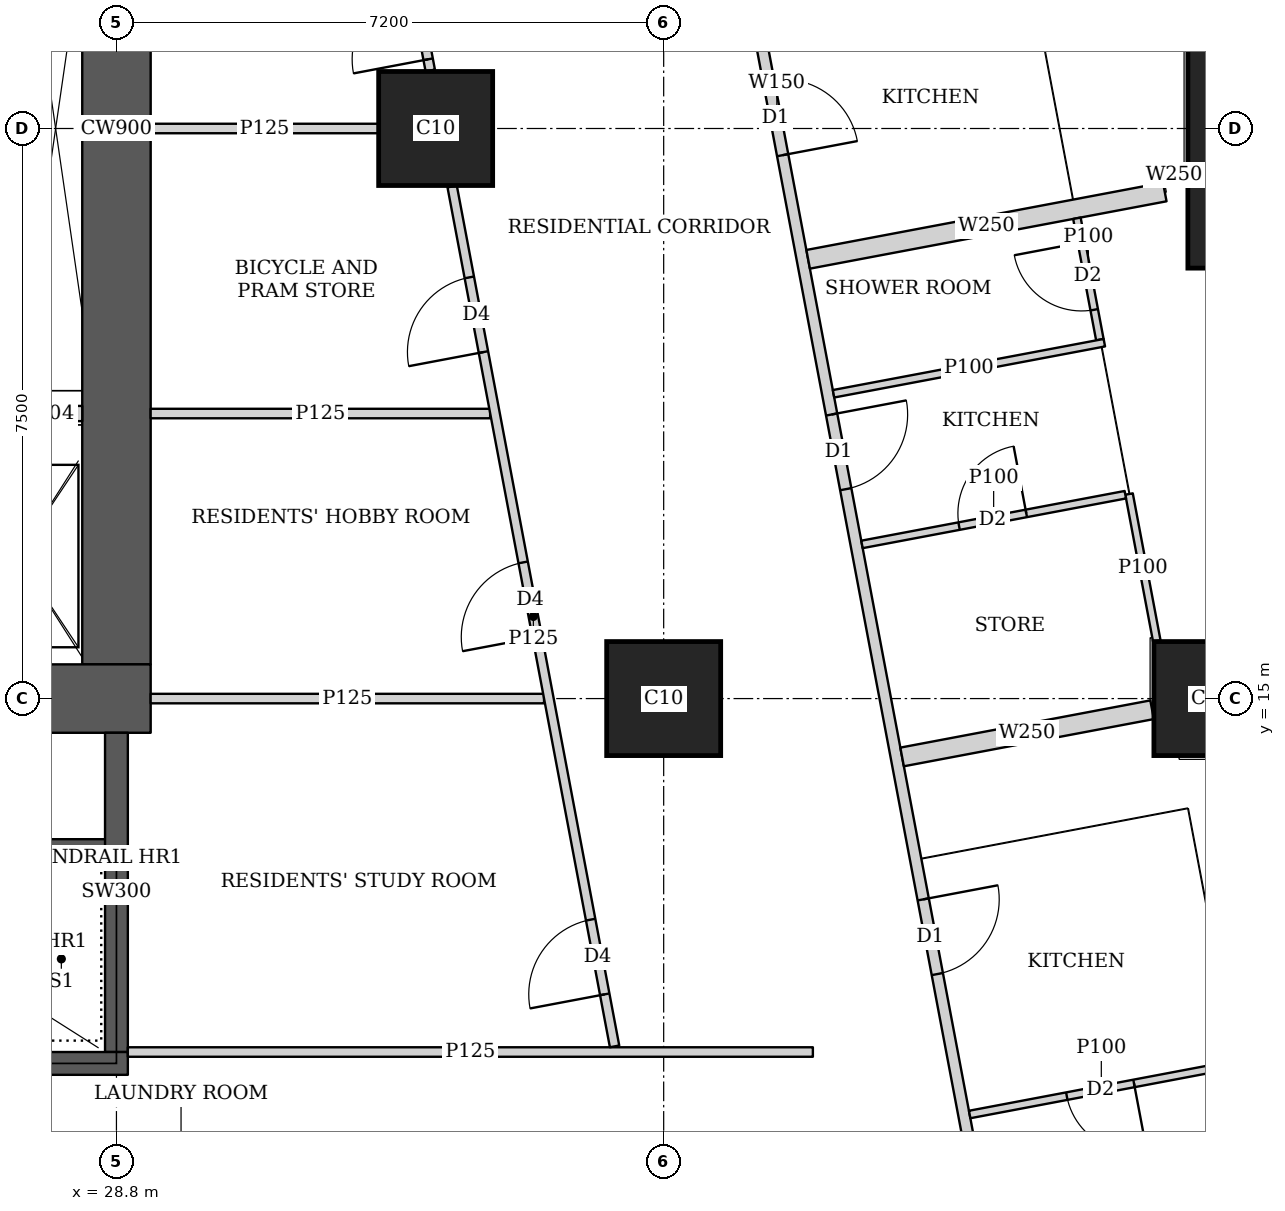
"""IFC4 building model, lengths in metres.
Left out: names, types, materials, properties, quantities, classifications, styles, units other than length and angle.
Written with IfcOpenShell. Run it as: python <this file> out.ifc"""

import sys

from ifc_helpers import new_model, si_unit, direction, frame, frame_2d, origin, origin_2d, place, context, subcontext, project, spatial, rectangle, extrude, element, fill, save


model = new_model("IFC4")
c1 = context("Model", 3, precision=1e-05, world=origin(), true_north=direction((0.0, 1.0)))
c2 = subcontext(c1, "Body", "Model", "MODEL_VIEW")
j1 = project(units=[si_unit("LENGTHUNIT", "METRE"), si_unit("PLANEANGLEUNIT", "RADIAN")], contexts=[c1])
p1 = place(None, origin())
s1 = spatial("IfcSite", under=j1, at=p1, CompositionType="ELEMENT")
p2 = place(p1, origin())
s2 = spatial("IfcBuilding", under=s1, at=p2, CompositionType="ELEMENT")
p3 = place(p2, frame((0.0, 0.0, 139.55)))
s3 = spatial("IfcBuildingStorey", under=s2, at=p3, CompositionType="ELEMENT", Elevation=139.55)
for number, where, z_axis, x_axis in (
    (1, (36.0, 15.0, 0.0), (0.0, 0.0, 1.0), (1.0, 0.0, 0.0)),
    (2, (43.2, 15.0, 0.0), (0.0, 0.0, 1.0), (1.0, 0.0, 0.0)),
    (3, (33.0, 22.5, 0.0), (0.0, 0.0, 1.0), (1.0, 0.0, 0.0)),
):
    element("IfcColumn", number, at=place(p3, frame(where, z_axis=z_axis, x_axis=x_axis)), inside=s3, PredefinedType="COLUMN", context=c2, shape_type="SweptSolid", body=[
        extrude(rectangle(XDim=1.5, YDim=1.5, at=origin_2d()), origin(), (0.0, 0.0, 1.0), 3.75),
    ])
p4 = place(p3, frame((44.697, 22.263, 0.0), z_axis=(0.0, 0.0, 1.0), x_axis=(1.0, 0.0, 0.0)))
e4 = element("IfcColumn", 4, at=p4, inside=s3, PredefinedType="COLUMN", context=c2, shape_type="SweptSolid", body=[
    extrude(rectangle(XDim=3.6, YDim=3.2, at=origin_2d()), origin(), (0.0, 0.0, 1.0), 3.75),
])
p5 = place(p3, frame((13.95, 15.0, 0.0), z_axis=(0.0, 0.0, 1.0), x_axis=(1.0, 0.0, 0.0)))
e5 = element("IfcWall", 5, at=p5, inside=s3, PredefinedType="SHEAR", context=c2, shape_type="SweptSolid", body=[
    extrude(rectangle(XDim=15.3, YDim=0.9, at=frame_2d((7.65, 0.0))), origin(), (0.0, 0.0, 1.0), 3.75),
])
p6 = place(p5, frame((4.45, 0.0, 0.0)))
e6 = element("IfcOpeningElement", 6, at=p6, cuts=e5, PredefinedType="OPENING", context=c2, shape_type="SweptSolid", body=[
    extrude(rectangle(XDim=1.8, YDim=2.1, at=frame_2d((0.9, 1.05))), frame((0.0, 0.46, 0.0), z_axis=(0.0, -1.0, 0.0), x_axis=(1.0, 0.0, 0.0)), (0.0, 0.0, 1.0), 0.92),
])
p7 = place(p5, frame((10.7, 0.0, 0.0)))
e7 = element("IfcOpeningElement", 7, at=p7, cuts=e5, PredefinedType="OPENING", context=c2, shape_type="SweptSolid", body=[
    extrude(rectangle(XDim=1.1, YDim=2.1, at=frame_2d((0.55, 1.05))), frame((0.0, 0.46, 0.0), z_axis=(0.0, -1.0, 0.0), x_axis=(1.0, 0.0, 0.0)), (0.0, 0.0, 1.0), 0.92),
])
p8 = place(p3, frame((28.8, 15.45, 0.0), z_axis=(0.0, 0.0, 1.0), x_axis=(0.0, 1.0, 0.0)))
e8 = element("IfcWall", 8, at=p8, inside=s3, PredefinedType="SHEAR", context=c2, shape_type="SweptSolid", body=[
    extrude(rectangle(XDim=14.1, YDim=0.9, at=frame_2d((7.05, 0.0))), origin(), (0.0, 0.0, 1.0), 3.75),
])
p9 = place(p3, frame((21.45, 10.2, 0.0), z_axis=(0.0, 0.0, 1.0), x_axis=(1.0, 0.0, 0.0)))
e9 = element("IfcWall", 9, at=p9, inside=s3, PredefinedType="SHEAR", context=c2, shape_type="SweptSolid", body=[
    extrude(rectangle(XDim=7.5, YDim=0.3, at=frame_2d((3.75, 0.0))), origin(), (0.0, 0.0, 1.0), 3.75),
])
p10 = place(p9, frame((0.5, 0.0, 0.0)))
e10 = element("IfcOpeningElement", 10, at=p10, cuts=e9, PredefinedType="OPENING", context=c2, shape_type="SweptSolid", body=[
    extrude(rectangle(XDim=1.1, YDim=2.1, at=frame_2d((0.55, 1.05))), frame((0.0, 0.16, 0.0), z_axis=(0.0, -1.0, 0.0), x_axis=(1.0, 0.0, 0.0)), (0.0, 0.0, 1.0), 0.32),
])
p11 = place(p3, frame((28.8, 10.35, 0.0), z_axis=(0.0, 0.0, 1.0), x_axis=(0.0, 1.0, 0.0)))
e11 = element("IfcWall", 11, at=p11, inside=s3, PredefinedType="SHEAR", context=c2, shape_type="SweptSolid", body=[
    extrude(rectangle(XDim=4.2, YDim=0.3, at=frame_2d((2.1, 0.0))), origin(), (0.0, 0.0, 1.0), 3.75),
])
p12 = place(p3, frame((50.653, 2.703, 0.0), z_axis=(0.0, 0.0, 1.0), x_axis=(-0.185612026696, 0.982623109613, 0.0)))
e12 = element("IfcWall", 12, at=p12, inside=s3, PredefinedType="SOLIDWALL", context=c2, shape_type="SweptSolid", body=[
    extrude(rectangle(XDim=41.393, YDim=0.2, at=frame_2d((20.697, 0.0))), origin(), (0.0, 0.0, 1.0), 3.5),
])
p13 = place(p12, frame((1.633, 0.0, 0.9)))
e13 = element("IfcOpeningElement", 13, at=p13, cuts=e12, PredefinedType="OPENING", context=c2, shape_type="SweptSolid", body=[
    extrude(rectangle(XDim=1.8, YDim=1.5, at=frame_2d((0.9, 0.75))), frame((0.0, 0.11, 0.0), z_axis=(0.0, -1.0, 0.0), x_axis=(1.0, 0.0, 0.0)), (0.0, 0.0, 1.0), 0.22),
])
p14 = place(p12, frame((6.032, 0.0, 0.9)))
e14 = element("IfcOpeningElement", 14, at=p14, cuts=e12, PredefinedType="OPENING", context=c2, shape_type="SweptSolid", body=[
    extrude(rectangle(XDim=1.8, YDim=1.5, at=frame_2d((0.9, 0.75))), frame((0.0, 0.11, 0.0), z_axis=(0.0, -1.0, 0.0), x_axis=(1.0, 0.0, 0.0)), (0.0, 0.0, 1.0), 0.22),
])
p15 = place(p12, frame((9.848, 0.0, 0.9)))
e15 = element("IfcOpeningElement", 15, at=p15, cuts=e12, PredefinedType="OPENING", context=c2, shape_type="SweptSolid", body=[
    extrude(rectangle(XDim=1.8, YDim=1.5, at=frame_2d((0.9, 0.75))), frame((0.0, 0.11, 0.0), z_axis=(0.0, -1.0, 0.0), x_axis=(1.0, 0.0, 0.0)), (0.0, 0.0, 1.0), 0.22),
])
p16 = place(p12, frame((13.664, 0.0, 0.9)))
e16 = element("IfcOpeningElement", 16, at=p16, cuts=e12, PredefinedType="OPENING", context=c2, shape_type="SweptSolid", body=[
    extrude(rectangle(XDim=1.8, YDim=1.5, at=frame_2d((0.9, 0.75))), frame((0.0, 0.11, 0.0), z_axis=(0.0, -1.0, 0.0), x_axis=(1.0, 0.0, 0.0)), (0.0, 0.0, 1.0), 0.22),
])
p17 = place(p12, frame((17.481, 0.0, 0.9)))
e17 = element("IfcOpeningElement", 17, at=p17, cuts=e12, PredefinedType="OPENING", context=c2, shape_type="SweptSolid", body=[
    extrude(rectangle(XDim=1.8, YDim=1.5, at=frame_2d((0.9, 0.75))), frame((0.0, 0.11, 0.0), z_axis=(0.0, -1.0, 0.0), x_axis=(1.0, 0.0, 0.0)), (0.0, 0.0, 1.0), 0.22),
])
p18 = place(p12, frame((21.297, 0.0, 0.9)))
e18 = element("IfcOpeningElement", 18, at=p18, cuts=e12, PredefinedType="OPENING", context=c2, shape_type="SweptSolid", body=[
    extrude(rectangle(XDim=1.8, YDim=1.5, at=frame_2d((0.9, 0.75))), frame((0.0, 0.11, 0.0), z_axis=(0.0, -1.0, 0.0), x_axis=(1.0, 0.0, 0.0)), (0.0, 0.0, 1.0), 0.22),
])
p19 = place(p12, frame((25.113, 0.0, 0.9)))
e19 = element("IfcOpeningElement", 19, at=p19, cuts=e12, PredefinedType="OPENING", context=c2, shape_type="SweptSolid", body=[
    extrude(rectangle(XDim=1.8, YDim=1.5, at=frame_2d((0.9, 0.75))), frame((0.0, 0.11, 0.0), z_axis=(0.0, -1.0, 0.0), x_axis=(1.0, 0.0, 0.0)), (0.0, 0.0, 1.0), 0.22),
])
p20 = place(p12, frame((28.93, 0.0, 0.9)))
e20 = element("IfcOpeningElement", 20, at=p20, cuts=e12, PredefinedType="OPENING", context=c2, shape_type="SweptSolid", body=[
    extrude(rectangle(XDim=1.8, YDim=1.5, at=frame_2d((0.9, 0.75))), frame((0.0, 0.11, 0.0), z_axis=(0.0, -1.0, 0.0), x_axis=(1.0, 0.0, 0.0)), (0.0, 0.0, 1.0), 0.22),
])
p21 = place(p12, frame((32.746, 0.0, 0.9)))
e21 = element("IfcOpeningElement", 21, at=p21, cuts=e12, PredefinedType="OPENING", context=c2, shape_type="SweptSolid", body=[
    extrude(rectangle(XDim=1.8, YDim=1.5, at=frame_2d((0.9, 0.75))), frame((0.0, 0.11, 0.0), z_axis=(0.0, -1.0, 0.0), x_axis=(1.0, 0.0, 0.0)), (0.0, 0.0, 1.0), 0.22),
])
p22 = place(p12, frame((36.481, 0.0, 0.9)))
e22 = element("IfcOpeningElement", 22, at=p22, cuts=e12, PredefinedType="OPENING", context=c2, shape_type="SweptSolid", body=[
    extrude(rectangle(XDim=1.8, YDim=1.5, at=frame_2d((0.9, 0.75))), frame((0.0, 0.11, 0.0), z_axis=(0.0, -1.0, 0.0), x_axis=(1.0, 0.0, 0.0)), (0.0, 0.0, 1.0), 0.22),
])
p23 = place(p3, frame((33.623, 43.022, 0.0), z_axis=(0.0, 0.0, 1.0), x_axis=(0.185596841028, -0.98262597798, 0.0)))
e23 = element("IfcWall", 23, at=p23, inside=s3, PredefinedType="SOLIDWALL", context=c2, shape_type="SweptSolid", body=[
    extrude(rectangle(XDim=41.66, YDim=0.15, at=frame_2d((20.83, 0.0))), origin(), (0.0, 0.0, 1.0), 2.5),
])
p24 = place(p23, frame((20.242, 0.0, 0.0)))
e24 = element("IfcOpeningElement", 24, at=p24, cuts=e23, PredefinedType="OPENING", context=c2, shape_type="SweptSolid", body=[
    extrude(rectangle(XDim=1.0, YDim=2.1, at=frame_2d((0.5, 1.05))), frame((0.0, 0.085, 0.0), z_axis=(0.0, -1.0, 0.0), x_axis=(1.0, 0.0, 0.0)), (0.0, 0.0, 1.0), 0.17),
])
p25 = place(p23, frame((24.714, 0.0, 0.0)))
e25 = element("IfcOpeningElement", 25, at=p25, cuts=e23, PredefinedType="OPENING", context=c2, shape_type="SweptSolid", body=[
    extrude(rectangle(XDim=1.0, YDim=2.1, at=frame_2d((0.5, 1.05))), frame((0.0, 0.085, 0.0), z_axis=(0.0, -1.0, 0.0), x_axis=(1.0, 0.0, 0.0)), (0.0, 0.0, 1.0), 0.17),
])
p26 = place(p23, frame((31.206, 0.0, 0.0)))
e26 = element("IfcOpeningElement", 26, at=p26, cuts=e23, PredefinedType="OPENING", context=c2, shape_type="SweptSolid", body=[
    extrude(rectangle(XDim=1.0, YDim=2.1, at=frame_2d((0.5, 1.05))), frame((0.0, 0.085, 0.0), z_axis=(0.0, -1.0, 0.0), x_axis=(1.0, 0.0, 0.0)), (0.0, 0.0, 1.0), 0.17),
])
p27 = place(p3, frame((41.437, 21.319, 0.0), z_axis=(0.0, 0.0, 1.0), x_axis=(0.185793689589, -0.982588777113, 0.0)))
e27 = element("IfcWall", 27, at=p27, inside=s3, PredefinedType="PARTITIONING", context=c2, shape_type="SweptSolid", body=[
    extrude(rectangle(XDim=1.625, YDim=0.1, at=frame_2d((0.813, 0.0))), origin(), (0.0, 0.0, 1.0), 3.5),
])
p28 = place(p27, frame((0.325, 0.0, 0.0)))
e28 = element("IfcOpeningElement", 28, at=p28, cuts=e27, PredefinedType="OPENING", context=c2, shape_type="SweptSolid", body=[
    extrude(rectangle(XDim=0.9, YDim=2.1, at=frame_2d((0.45, 1.05))), frame((0.0, 0.06, 0.0), z_axis=(0.0, -1.0, 0.0), x_axis=(1.0, 0.0, 0.0)), (0.0, 0.0, 1.0), 0.12),
])
p29 = place(p3, frame((41.798, 19.682, 0.0), z_axis=(0.0, 0.0, 1.0), x_axis=(-0.982681091817, -0.185304807776, 0.0)))
e29 = element("IfcWall", 29, at=p29, inside=s3, PredefinedType="PARTITIONING", context=c2, shape_type="SweptSolid", body=[
    extrude(rectangle(XDim=3.626, YDim=0.1, at=frame_2d((1.813, 0.0))), origin(), (0.0, 0.0, 1.0), 3.5),
])
p30 = place(p3, frame((42.123, 17.691, 0.0), z_axis=(0.0, 0.0, 1.0), x_axis=(0.185554843339, -0.982633909507, 0.0)))
e30 = element("IfcWall", 30, at=p30, inside=s3, PredefinedType="PARTITIONING", context=c2, shape_type="SweptSolid", body=[
    extrude(rectangle(XDim=1.967, YDim=0.1, at=frame_2d((0.983, 0.0))), origin(), (0.0, 0.0, 1.0), 3.5),
])
p31 = place(p3, frame((42.074, 17.682, 0.0), z_axis=(0.0, 0.0, 1.0), x_axis=(-0.982660701716, -0.185412904897, 0.0)))
e31 = element("IfcWall", 31, at=p31, inside=s3, PredefinedType="PARTITIONING", context=c2, shape_type="SweptSolid", body=[
    extrude(rectangle(XDim=3.526, YDim=0.1, at=frame_2d((1.763, 0.0))), origin(), (0.0, 0.0, 1.0), 3.5),
])
p32 = place(p31, frame((1.326, 0.0, 0.0)))
e32 = element("IfcOpeningElement", 32, at=p32, cuts=e31, PredefinedType="OPENING", context=c2, shape_type="SweptSolid", body=[
    extrude(rectangle(XDim=0.9, YDim=2.1, at=frame_2d((0.45, 1.05))), frame((0.0, 0.06, 0.0), z_axis=(0.0, -1.0, 0.0), x_axis=(1.0, 0.0, 0.0)), (0.0, 0.0, 1.0), 0.12),
])
p33 = place(p3, frame((42.873, 21.918, 0.0), z_axis=(0.0, 0.0, 1.0), x_axis=(-0.982431406936, -0.186624035603, 0.0)))
e33 = element("IfcWall", 33, at=p33, inside=s3, PredefinedType="SOLIDWALL", context=c2, shape_type="SweptSolid", body=[
    extrude(rectangle(XDim=0.322, YDim=0.25, at=frame_2d((0.161, 0.0))), origin(), (0.0, 0.0, 1.0), 2.5),
])
p34 = place(p3, frame((42.593, 21.665, 0.0), z_axis=(0.0, 0.0, 1.0), x_axis=(-0.982635807605, -0.185544791394, 0.0)))
e34 = element("IfcWall", 34, at=p34, inside=s3, PredefinedType="SOLIDWALL", context=c2, shape_type="SweptSolid", body=[
    extrude(rectangle(XDim=4.775, YDim=0.25, at=frame_2d((2.388, 0.0))), origin(), (0.0, 0.0, 1.0), 2.5),
])
p35 = place(p3, frame((43.49, 10.183, 0.0), z_axis=(0.0, 0.0, 1.0), x_axis=(-0.982588017646, -0.185797706064, 0.0)))
e35 = element("IfcWall", 35, at=p35, inside=s3, PredefinedType="PARTITIONING", context=c2, shape_type="SweptSolid", body=[
    extrude(rectangle(XDim=3.525, YDim=0.1, at=frame_2d((1.763, 0.0))), origin(), (0.0, 0.0, 1.0), 3.5),
])
p36 = place(p35, frame((1.325, 0.0, 0.0)))
e36 = element("IfcOpeningElement", 36, at=p36, cuts=e35, PredefinedType="OPENING", context=c2, shape_type="SweptSolid", body=[
    extrude(rectangle(XDim=0.9, YDim=2.1, at=frame_2d((0.45, 1.05))), frame((0.0, 0.06, 0.0), z_axis=(0.0, -1.0, 0.0), x_axis=(1.0, 0.0, 0.0)), (0.0, 0.0, 1.0), 0.12),
])
p37 = place(p3, frame((42.426, 14.853, 0.0), z_axis=(0.0, 0.0, 1.0), x_axis=(-0.982633560103, -0.185556693654, 0.0)))
e37 = element("IfcWall", 37, at=p37, inside=s3, PredefinedType="SOLIDWALL", context=c2, shape_type="SweptSolid", body=[
    extrude(rectangle(XDim=3.347, YDim=0.25, at=frame_2d((1.674, 0.0))), origin(), (0.0, 0.0, 1.0), 3.5),
])
p38 = place(p3, frame((28.95, 10.35, 0.0), z_axis=(0.0, 0.0, 1.0), x_axis=(1.0, 0.0, 0.0)))
e38 = element("IfcWall", 38, at=p38, inside=s3, PredefinedType="PARTITIONING", context=c2, shape_type="SweptSolid", body=[
    extrude(rectangle(XDim=9.013, YDim=0.125, at=frame_2d((4.506, 0.0))), origin(), (0.0, 0.0, 1.0), 3.5),
])
p39 = place(p3, frame((35.354, 10.424, 0.0), z_axis=(0.0, 0.0, 1.0), x_axis=(-0.185612234763, 0.982623070311, 0.0)))
e39 = element("IfcWall", 39, at=p39, inside=s3, PredefinedType="PARTITIONING", context=c2, shape_type="SweptSolid", body=[
    extrude(rectangle(XDim=11.513, YDim=0.125, at=frame_2d((5.756, 0.0))), origin(), (0.0, 0.0, 1.0), 3.5),
])
p40 = place(p39, frame((0.697, 0.0, 0.0)))
e40 = element("IfcOpeningElement", 40, at=p40, cuts=e39, PredefinedType="OPENING", context=c2, shape_type="SweptSolid", body=[
    extrude(rectangle(XDim=1.0, YDim=2.1, at=frame_2d((0.5, 1.05))), frame((0.0, 0.073, 0.0), z_axis=(0.0, -1.0, 0.0), x_axis=(1.0, 0.0, 0.0)), (0.0, 0.0, 1.0), 0.145),
])
p41 = place(p39, frame((5.48, 0.0, 0.0)))
e41 = element("IfcOpeningElement", 41, at=p41, cuts=e39, PredefinedType="OPENING", context=c2, shape_type="SweptSolid", body=[
    extrude(rectangle(XDim=1.0, YDim=2.1, at=frame_2d((0.5, 1.05))), frame((0.0, 0.073, 0.0), z_axis=(0.0, -1.0, 0.0), x_axis=(1.0, 0.0, 0.0)), (0.0, 0.0, 1.0), 0.145),
])
p42 = place(p39, frame((9.296, 0.0, 0.0)))
e42 = element("IfcOpeningElement", 42, at=p42, cuts=e39, PredefinedType="OPENING", context=c2, shape_type="SweptSolid", body=[
    extrude(rectangle(XDim=1.0, YDim=2.1, at=frame_2d((0.5, 1.05))), frame((0.0, 0.073, 0.0), z_axis=(0.0, -1.0, 0.0), x_axis=(1.0, 0.0, 0.0)), (0.0, 0.0, 1.0), 0.145),
])
p43 = place(p3, frame((32.929, 23.263, 0.0), z_axis=(0.0, 0.0, 1.0), x_axis=(-0.185612234763, 0.982623070311, 0.0)))
e43 = element("IfcWall", 43, at=p43, inside=s3, PredefinedType="PARTITIONING", context=c2, shape_type="SweptSolid", body=[
    extrude(rectangle(XDim=11.513, YDim=0.125, at=frame_2d((5.756, 0.0))), origin(), (0.0, 0.0, 1.0), 3.5),
])
p44 = place(p43, frame((0.15, 0.0, 0.0)))
e44 = element("IfcOpeningElement", 44, at=p44, cuts=e43, PredefinedType="OPENING", context=c2, shape_type="SweptSolid", body=[
    extrude(rectangle(XDim=1.0, YDim=2.1, at=frame_2d((0.5, 1.05))), frame((0.0, 0.073, 0.0), z_axis=(0.0, -1.0, 0.0), x_axis=(1.0, 0.0, 0.0)), (0.0, 0.0, 1.0), 0.145),
])
p45 = place(p43, frame((7.679, 0.0, 0.0)))
e45 = element("IfcOpeningElement", 45, at=p45, cuts=e43, PredefinedType="OPENING", context=c2, shape_type="SweptSolid", body=[
    extrude(rectangle(XDim=1.0, YDim=2.1, at=frame_2d((0.5, 1.05))), frame((0.0, 0.073, 0.0), z_axis=(0.0, -1.0, 0.0), x_axis=(1.0, 0.0, 0.0)), (0.0, 0.0, 1.0), 0.145),
])
p46 = place(p3, frame((29.25, 15.0, 0.0), z_axis=(0.0, 0.0, 1.0), x_axis=(1.0, 0.0, 0.0)))
e46 = element("IfcWall", 46, at=p46, inside=s3, PredefinedType="PARTITIONING", context=c2, shape_type="SweptSolid", body=[
    extrude(rectangle(XDim=5.176, YDim=0.125, at=frame_2d((2.588, 0.0))), origin(), (0.0, 0.0, 1.0), 3.5),
])
p47 = place(p3, frame((29.25, 18.75, 0.0), z_axis=(0.0, 0.0, 1.0), x_axis=(1.0, 0.0, 0.0)))
e47 = element("IfcWall", 47, at=p47, inside=s3, PredefinedType="PARTITIONING", context=c2, shape_type="SweptSolid", body=[
    extrude(rectangle(XDim=4.467, YDim=0.125, at=frame_2d((2.233, 0.0))), origin(), (0.0, 0.0, 1.0), 3.5),
])
p48 = place(p3, frame((29.25, 22.5, 0.0), z_axis=(0.0, 0.0, 1.0), x_axis=(1.0, 0.0, 0.0)))
e48 = element("IfcWall", 48, at=p48, inside=s3, PredefinedType="PARTITIONING", context=c2, shape_type="SweptSolid", body=[
    extrude(rectangle(XDim=2.999, YDim=0.125, at=frame_2d((1.5, 0.0))), origin(), (0.0, 0.0, 1.0), 3.5),
])
p49 = place(p3, frame((23.0, 13.05, 0.0), z_axis=(0.0, 0.0, 1.0), x_axis=(1.0, 0.0, 0.0)))
e49 = element("IfcWall", 49, at=p49, inside=s3, PredefinedType="SHEAR", context=c2, shape_type="SweptSolid", body=[
    extrude(rectangle(XDim=5.8, YDim=0.2, at=frame_2d((2.9, 0.0))), origin(), (0.0, 0.0, 1.0), 3.75),
])
p50 = place(p3, frame((27.4, 18.75, 0.0), z_axis=(0.0, 0.0, 1.0), x_axis=(1.0, 0.0, 0.0)))
e50 = element("IfcWall", 50, at=p50, inside=s3, PredefinedType="SOLIDWALL", context=c2, shape_type="SweptSolid", body=[
    extrude(rectangle(XDim=0.95, YDim=0.2, at=frame_2d((0.475, 0.0))), origin(), (0.0, 0.0, 1.0), 3.5),
])
p51 = place(p24, origin())
e51 = element("IfcDoor", 51, at=p51, inside=s3, OperationType="SINGLE_SWING_RIGHT", PredefinedType="DOOR", context=c2, shape_type="SweptSolid", body=[
    extrude(rectangle(XDim=1.0, YDim=2.1, at=frame_2d((0.5, 1.05))), frame((0.0, 0.025, 0.0), z_axis=(0.0, -1.0, 0.0), x_axis=(1.0, 0.0, 0.0)), (0.0, 0.0, 1.0), 0.05),
])
fill(e24, e51)
p52 = place(p28, origin())
e52 = element("IfcDoor", 52, at=p52, inside=s3, OperationType="SINGLE_SWING_RIGHT", PredefinedType="DOOR", context=c2, shape_type="SweptSolid", body=[
    extrude(rectangle(XDim=0.9, YDim=2.1, at=frame_2d((0.45, 1.05))), frame((0.0, 0.025, 0.0), z_axis=(0.0, -1.0, 0.0), x_axis=(1.0, 0.0, 0.0)), (0.0, 0.0, 1.0), 0.05),
])
fill(e28, e52)
p53 = place(p25, origin())
e53 = element("IfcDoor", 53, at=p53, inside=s3, OperationType="SINGLE_SWING_LEFT", PredefinedType="DOOR", context=c2, shape_type="SweptSolid", body=[
    extrude(rectangle(XDim=1.0, YDim=2.1, at=frame_2d((0.5, 1.05))), frame((0.0, 0.025, 0.0), z_axis=(0.0, -1.0, 0.0), x_axis=(1.0, 0.0, 0.0)), (0.0, 0.0, 1.0), 0.05),
])
fill(e25, e53)
p54 = place(p26, origin())
e54 = element("IfcDoor", 54, at=p54, inside=s3, OperationType="SINGLE_SWING_LEFT", PredefinedType="DOOR", context=c2, shape_type="SweptSolid", body=[
    extrude(rectangle(XDim=1.0, YDim=2.1, at=frame_2d((0.5, 1.05))), frame((0.0, 0.025, 0.0), z_axis=(0.0, -1.0, 0.0), x_axis=(1.0, 0.0, 0.0)), (0.0, 0.0, 1.0), 0.05),
])
fill(e26, e54)
p55 = place(p36, origin())
e55 = element("IfcDoor", 55, at=p55, inside=s3, OperationType="SINGLE_SWING_LEFT", PredefinedType="DOOR", context=c2, shape_type="SweptSolid", body=[
    extrude(rectangle(XDim=0.9, YDim=2.1, at=frame_2d((0.45, 1.05))), frame((0.0, 0.025, 0.0), z_axis=(0.0, -1.0, 0.0), x_axis=(1.0, 0.0, 0.0)), (0.0, 0.0, 1.0), 0.05),
])
fill(e36, e55)
p56 = place(p32, origin())
e56 = element("IfcDoor", 56, at=p56, inside=s3, OperationType="SINGLE_SWING_RIGHT", PredefinedType="DOOR", context=c2, shape_type="SweptSolid", body=[
    extrude(rectangle(XDim=0.9, YDim=2.1, at=frame_2d((0.45, 1.05))), frame((0.0, 0.025, 0.0), z_axis=(0.0, -1.0, 0.0), x_axis=(1.0, 0.0, 0.0)), (0.0, 0.0, 1.0), 0.05),
])
fill(e32, e56)
p57 = place(p40, origin())
e57 = element("IfcDoor", 57, at=p57, inside=s3, OperationType="SINGLE_SWING_LEFT", PredefinedType="DOOR", context=c2, shape_type="SweptSolid", body=[
    extrude(rectangle(XDim=1.0, YDim=2.1, at=frame_2d((0.5, 1.05))), frame((0.0, 0.025, 0.0), z_axis=(0.0, -1.0, 0.0), x_axis=(1.0, 0.0, 0.0)), (0.0, 0.0, 1.0), 0.05),
])
fill(e40, e57)
p58 = place(p41, origin())
e58 = element("IfcDoor", 58, at=p58, inside=s3, OperationType="SINGLE_SWING_LEFT", PredefinedType="DOOR", context=c2, shape_type="SweptSolid", body=[
    extrude(rectangle(XDim=1.0, YDim=2.1, at=frame_2d((0.5, 1.05))), frame((0.0, 0.025, 0.0), z_axis=(0.0, -1.0, 0.0), x_axis=(1.0, 0.0, 0.0)), (0.0, 0.0, 1.0), 0.05),
])
fill(e41, e58)
p59 = place(p42, origin())
e59 = element("IfcDoor", 59, at=p59, inside=s3, OperationType="SINGLE_SWING_LEFT", PredefinedType="DOOR", context=c2, shape_type="SweptSolid", body=[
    extrude(rectangle(XDim=1.0, YDim=2.1, at=frame_2d((0.5, 1.05))), frame((0.0, 0.025, 0.0), z_axis=(0.0, -1.0, 0.0), x_axis=(1.0, 0.0, 0.0)), (0.0, 0.0, 1.0), 0.05),
])
fill(e42, e59)
p60 = place(p44, origin())
e60 = element("IfcDoor", 60, at=p60, inside=s3, OperationType="SINGLE_SWING_LEFT", PredefinedType="DOOR", context=c2, shape_type="SweptSolid", body=[
    extrude(rectangle(XDim=1.0, YDim=2.1, at=frame_2d((0.5, 1.05))), frame((0.0, 0.025, 0.0), z_axis=(0.0, -1.0, 0.0), x_axis=(1.0, 0.0, 0.0)), (0.0, 0.0, 1.0), 0.05),
])
fill(e44, e60)
save(model, sys.argv[1])
